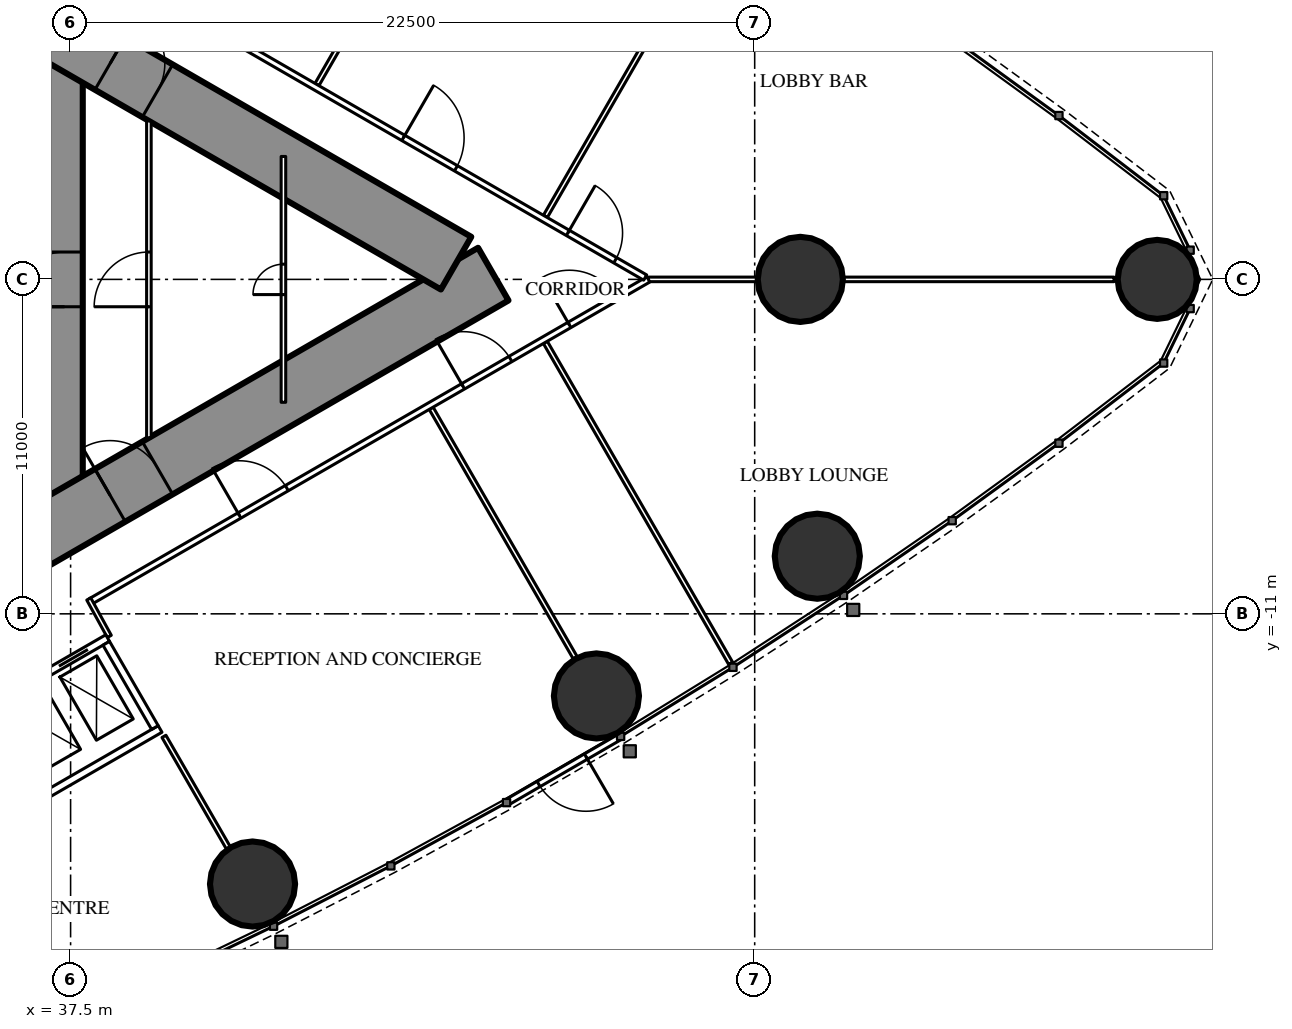
"""IFC4 building model, lengths in metres.
Left out: names, types, materials, properties, quantities, classifications, styles, units other than length and angle.
Written with IfcOpenShell. Run it as: python <this file> out.ifc"""

import sys

from ifc_helpers import new_model, si_unit, direction, frame, frame_2d, origin, origin_2d, place, context, subcontext, project, spatial, rectangle, hollow_circle, extrude, element, fill, save


model = new_model("IFC4")
c1 = context("Model", 3, precision=1e-05, world=origin(), true_north=direction((0.0, 1.0)))
c2 = subcontext(c1, "Body", "Model", "MODEL_VIEW")
j1 = project(units=[si_unit("LENGTHUNIT", "METRE"), si_unit("PLANEANGLEUNIT", "RADIAN")], contexts=[c1])
p1 = place(None, origin())
s1 = spatial("IfcSite", under=j1, at=p1, CompositionType="ELEMENT")
p2 = place(p1, origin())
s2 = spatial("IfcBuilding", under=s1, at=p2, CompositionType="ELEMENT")
p3 = place(p2, origin())
s3 = spatial("IfcBuildingStorey", under=s2, at=p3, CompositionType="ELEMENT", Elevation=0.0)
p4 = place(p3, frame((73.239, 0.0, 0.0), z_axis=(0.0, 0.0, 1.0), x_axis=(1.0, 0.0, 0.0)))
e1 = element("IfcColumn", 1, at=p4, inside=s3, PredefinedType="COLUMN", context=c2, shape_type="SweptSolid", body=[
    extrude(hollow_circle(Radius=1.3, WallThickness=0.1, at=origin_2d()), origin(), (0.0, 0.0, 1.0), 7.2),
])
for number, where, z_axis, x_axis in (
    (2, (43.484, -19.886, 0.0), (0.0, 0.0, 1.0), (1.0, 0.0, 0.0)),
    (3, (54.795, -13.701, 0.0), (0.0, 0.0, 1.0), (1.0, 0.0, 0.0)),
    (4, (62.059, -9.105, 0.0), (0.0, 0.0, 1.0), (1.0, 0.0, 0.0)),
):
    element("IfcColumn", number, at=place(p3, frame(where, z_axis=z_axis, x_axis=x_axis)), inside=s3, PredefinedType="COLUMN", context=c2, shape_type="SweptSolid", body=[
        extrude(hollow_circle(Radius=1.4, WallThickness=0.12, at=origin_2d()), origin(), (0.0, 0.0, 1.0), 7.2),
    ])
p5 = place(p3, frame((61.5, 0.0, 0.0), z_axis=(0.0, 0.0, 1.0), x_axis=(1.0, 0.0, 0.0)))
e5 = element("IfcColumn", 5, at=p5, inside=s3, PredefinedType="COLUMN", context=c2, shape_type="SweptSolid", body=[
    extrude(hollow_circle(Radius=1.4, WallThickness=0.1, at=origin_2d()), origin(), (0.0, 0.0, 1.0), 7.2),
])
p6 = place(p3, frame((37.3, -8.6, 0.0), z_axis=(0.0, 0.0, 1.0), x_axis=(0.0, 1.0, 0.0)))
e6 = element("IfcWall", 6, at=p6, inside=s3, PredefinedType="SHEAR", context=c2, shape_type="SweptSolid", body=[
    extrude(rectangle(XDim=17.2, YDim=1.2, at=frame_2d((8.6, 0.0))), origin(), (0.0, 0.0, 1.0), 7.2),
])
p7 = place(p6, frame((7.7, 0.0, 0.0)))
e7 = element("IfcOpeningElement", 7, at=p7, cuts=e6, PredefinedType="OPENING", context=c2, shape_type="SweptSolid", body=[
    extrude(rectangle(XDim=1.8, YDim=2.2, at=frame_2d((0.9, 1.1))), frame((0.0, 0.61, 0.0), z_axis=(0.0, -1.0, 0.0), x_axis=(1.0, 0.0, 0.0)), (0.0, 0.0, 1.0), 1.22),
])
p8 = place(p3, frame((27.2, -13.8, 0.0), z_axis=(0.0, 0.0, 1.0), x_axis=(0.866027159892, 0.499996958321, 0.0)))
e8 = element("IfcWall", 8, at=p8, inside=s3, PredefinedType="SHEAR", context=c2, shape_type="SweptSolid", body=[
    extrude(rectangle(XDim=27.947, YDim=2.0, at=frame_2d((13.973, 0.0))), origin(), (0.0, 0.0, 1.0), 7.2),
])
p9 = place(p8, frame((4.6, 0.0, 0.0)))
e9 = element("IfcOpeningElement", 9, at=p9, cuts=e8, PredefinedType="OPENING", context=c2, shape_type="SweptSolid", body=[
    extrude(rectangle(XDim=1.0, YDim=2.2, at=frame_2d((0.5, 1.1))), frame((0.0, 1.01, 0.0), z_axis=(0.0, -1.0, 0.0), x_axis=(1.0, 0.0, 0.0)), (0.0, 0.0, 1.0), 2.02),
])
p10 = place(p8, frame((13.395, 0.0, 0.0)))
e10 = element("IfcOpeningElement", 10, at=p10, cuts=e8, PredefinedType="OPENING", context=c2, shape_type="SweptSolid", body=[
    extrude(rectangle(XDim=1.8, YDim=2.2, at=frame_2d((0.9, 1.1))), frame((0.0, 1.01, 0.0), z_axis=(0.0, -1.0, 0.0), x_axis=(1.0, 0.0, 0.0)), (0.0, 0.0, 1.0), 2.02),
])
p11 = place(p3, frame((27.2, 13.8, 0.0), z_axis=(0.0, 0.0, 1.0), x_axis=(0.866024545924, -0.500001485854, 0.0)))
e11 = element("IfcWall", 11, at=p11, inside=s3, PredefinedType="SHEAR", context=c2, shape_type="SweptSolid", body=[
    extrude(rectangle(XDim=26.534, YDim=2.0, at=frame_2d((13.267, 0.0))), origin(), (0.0, 0.0, 1.0), 7.2),
])
p12 = place(p11, frame((4.6, 0.0, 0.0)))
e12 = element("IfcOpeningElement", 12, at=p12, cuts=e11, PredefinedType="OPENING", context=c2, shape_type="SweptSolid", body=[
    extrude(rectangle(XDim=1.0, YDim=2.2, at=frame_2d((0.5, 1.1))), frame((0.0, 1.01, 0.0), z_axis=(0.0, -1.0, 0.0), x_axis=(1.0, 0.0, 0.0)), (0.0, 0.0, 1.0), 2.02),
])
p13 = place(p11, frame((13.395, 0.0, 0.0)))
e13 = element("IfcOpeningElement", 13, at=p13, cuts=e11, PredefinedType="OPENING", context=c2, shape_type="SweptSolid", body=[
    extrude(rectangle(XDim=1.8, YDim=2.2, at=frame_2d((0.9, 1.1))), frame((0.0, 1.01, 0.0), z_axis=(0.0, -1.0, 0.0), x_axis=(1.0, 0.0, 0.0)), (0.0, 0.0, 1.0), 2.02),
])
p14 = place(p3, frame((55.59, -15.031, 0.0), z_axis=(0.0, 0.0, 1.0), x_axis=(-0.864866989785, -0.502001085637, 0.0)))
e14 = element("IfcWall", 14, at=p14, inside=s3, PredefinedType="STANDARD", context=c2, shape_type="SweptSolid", body=[
    extrude(rectangle(XDim=4.338, YDim=0.2, at=frame_2d((2.169, 0.0))), origin(), (0.0, 0.0, 1.0), 6.85),
])
p15 = place(p14, frame((1.319, 0.0, 0.0)))
e15 = element("IfcOpeningElement", 15, at=p15, cuts=e14, PredefinedType="OPENING", context=c2, shape_type="SweptSolid", body=[
    extrude(rectangle(XDim=1.8, YDim=2.4, at=frame_2d((0.9, 1.2))), frame((0.0, 0.11, 0.0), z_axis=(0.0, -1.0, 0.0), x_axis=(1.0, 0.0, 0.0)), (0.0, 0.0, 1.0), 0.22),
])
p16 = place(p3, frame((49.36, -4.239, 0.0), z_axis=(0.0, 0.0, 1.0), x_axis=(0.499984446848, -0.866034383215, 0.0)))
e16 = element("IfcWall", 16, at=p16, inside=s3, PredefinedType="PARTITIONING", context=c2, shape_type="SweptSolid", body=[
    extrude(rectangle(XDim=9.491, YDim=0.15, at=frame_2d((4.746, 0.0))), origin(), (0.0, 0.0, 1.0), 5.85),
])
p17 = place(p3, frame((53.115, -2.071, 0.0), z_axis=(0.0, 0.0, 1.0), x_axis=(0.500000975677, -0.866024840476, 0.0)))
e17 = element("IfcWall", 17, at=p17, inside=s3, PredefinedType="PARTITIONING", context=c2, shape_type="SweptSolid", body=[
    extrude(rectangle(XDim=12.191, YDim=0.15, at=frame_2d((6.095, 0.0))), origin(), (0.0, 0.0, 1.0), 6.85),
])
p18 = place(p3, frame((45.603, 6.408, 0.0), z_axis=(0.0, 0.0, 1.0), x_axis=(0.499999740363, 0.866025553686, 0.0)))
e18 = element("IfcWall", 18, at=p18, inside=s3, PredefinedType="PARTITIONING", context=c2, shape_type="SweptSolid", body=[
    extrude(rectangle(XDim=9.501, YDim=0.15, at=frame_2d((4.751, 0.0))), origin(), (0.0, 0.0, 1.0), 5.85),
])
p19 = place(p3, frame((53.115, 2.071, 0.0), z_axis=(0.0, 0.0, 1.0), x_axis=(0.500000975677, 0.866024840476, 0.0)))
e19 = element("IfcWall", 19, at=p19, inside=s3, PredefinedType="PARTITIONING", context=c2, shape_type="SweptSolid", body=[
    extrude(rectangle(XDim=12.191, YDim=0.15, at=frame_2d((6.095, 0.0))), origin(), (0.0, 0.0, 1.0), 6.85),
])
p20 = place(p3, frame((56.502, 0.0, 0.0), z_axis=(0.0, 0.0, 1.0), x_axis=(1.0, 0.0, 0.0)))
e20 = element("IfcWall", 20, at=p20, inside=s3, PredefinedType="PARTITIONING", context=c2, shape_type="SweptSolid", body=[
    extrude(rectangle(XDim=15.317, YDim=0.15, at=frame_2d((7.658, 0.0))), origin(), (0.0, 0.0, 1.0), 5.85),
])
p21 = place(p3, frame((40.57, -15.03, 0.0), z_axis=(0.0, 0.0, 1.0), x_axis=(0.500012993597, -0.866017901798, 0.0)))
e21 = element("IfcWall", 21, at=p21, inside=s3, PredefinedType="PARTITIONING", context=c2, shape_type="SweptSolid", body=[
    extrude(rectangle(XDim=4.243, YDim=0.15, at=frame_2d((2.122, 0.0))), origin(), (0.0, 0.0, 1.0), 6.85),
])
p22 = place(p3, frame((38.16, -10.59, 0.0), z_axis=(0.0, 0.0, 1.0), x_axis=(0.866027029586, 0.499997184019, 0.0)))
e22 = element("IfcWall", 22, at=p22, inside=s3, PredefinedType="PARTITIONING", context=c2, shape_type="SweptSolid", body=[
    extrude(rectangle(XDim=21.18, YDim=0.2, at=frame_2d((10.59, 0.0))), origin(), (0.0, 0.0, 1.0), 6.85),
])
p23 = place(p22, frame((14.142, 0.0, 0.0)))
e23 = element("IfcOpeningElement", 23, at=p23, cuts=e22, PredefinedType="OPENING", context=c2, shape_type="SweptSolid", body=[
    extrude(rectangle(XDim=1.8, YDim=2.2, at=frame_2d((0.9, 1.1))), frame((0.0, 0.11, 0.0), z_axis=(0.0, -1.0, 0.0), x_axis=(1.0, 0.0, 0.0)), (0.0, 0.0, 1.0), 0.22),
])
p24 = place(p22, frame((18.183, 0.0, 0.0)))
e24 = element("IfcOpeningElement", 24, at=p24, cuts=e22, PredefinedType="OPENING", context=c2, shape_type="SweptSolid", body=[
    extrude(rectangle(XDim=1.8, YDim=2.2, at=frame_2d((0.9, 1.1))), frame((0.0, 0.11, 0.0), z_axis=(0.0, -1.0, 0.0), x_axis=(1.0, 0.0, 0.0)), (0.0, 0.0, 1.0), 0.22),
])
p25 = place(p22, frame((5.65, 0.0, 0.0)))
e25 = element("IfcOpeningElement", 25, at=p25, cuts=e22, PredefinedType="OPENING", context=c2, shape_type="SweptSolid", body=[
    extrude(rectangle(XDim=1.8, YDim=2.2, at=frame_2d((0.9, 1.1))), frame((0.0, 0.11, 0.0), z_axis=(0.0, -1.0, 0.0), x_axis=(1.0, 0.0, 0.0)), (0.0, 0.0, 1.0), 0.22),
])
p26 = place(p3, frame((37.034, 11.24, 0.0), z_axis=(0.0, 0.0, 1.0), x_axis=(0.866025942536, -0.499999066854, 0.0)))
e26 = element("IfcWall", 26, at=p26, inside=s3, PredefinedType="PARTITIONING", context=c2, shape_type="SweptSolid", body=[
    extrude(rectangle(XDim=22.36, YDim=0.2, at=frame_2d((11.18, 0.0))), origin(), (0.0, 0.0, 1.0), 6.85),
])
p27 = place(p26, frame((19.423, 0.0, 0.0)))
e27 = element("IfcOpeningElement", 27, at=p27, cuts=e26, PredefinedType="OPENING", context=c2, shape_type="SweptSolid", body=[
    extrude(rectangle(XDim=1.8, YDim=2.2, at=frame_2d((0.9, 1.1))), frame((0.0, 0.11, 0.0), z_axis=(0.0, -1.0, 0.0), x_axis=(1.0, 0.0, 0.0)), (0.0, 0.0, 1.0), 0.22),
])
p28 = place(p26, frame((13.174, 0.0, 0.0)))
e28 = element("IfcOpeningElement", 28, at=p28, cuts=e26, PredefinedType="OPENING", context=c2, shape_type="SweptSolid", body=[
    extrude(rectangle(XDim=2.0, YDim=2.4, at=frame_2d((1.0, 1.2))), frame((0.0, 0.11, 0.0), z_axis=(0.0, -1.0, 0.0), x_axis=(1.0, 0.0, 0.0)), (0.0, 0.0, 1.0), 0.22),
])
p29 = place(p26, frame((4.602, 0.0, 0.0)))
e29 = element("IfcOpeningElement", 29, at=p29, cuts=e26, PredefinedType="OPENING", context=c2, shape_type="SweptSolid", body=[
    extrude(rectangle(XDim=1.8, YDim=2.2, at=frame_2d((0.9, 1.1))), frame((0.0, 0.11, 0.0), z_axis=(0.0, -1.0, 0.0), x_axis=(1.0, 0.0, 0.0)), (0.0, 0.0, 1.0), 0.22),
])
p30 = place(p3, frame((38.773, -11.742, 0.0), z_axis=(0.0, 0.0, 1.0), x_axis=(-0.481418475768, 0.876490873421, 0.0)))
e30 = element("IfcWall", 30, at=p30, inside=s3, PredefinedType="PARTITIONING", context=c2, shape_type="SweptSolid", body=[
    extrude(rectangle(XDim=1.405, YDim=0.15, at=frame_2d((0.703, 0.0))), origin(), (0.0, 0.0, 1.0), 6.85),
])
p31 = place(p3, frame((40.075, -5.212, 0.0), z_axis=(0.0, 0.0, 1.0), x_axis=(0.0, 1.0, 0.0)))
e31 = element("IfcWall", 31, at=p31, inside=s3, PredefinedType="PARTITIONING", context=c2, shape_type="SweptSolid", body=[
    extrude(rectangle(XDim=10.424, YDim=0.15, at=frame_2d((5.212, 0.0))), origin(), (0.0, 0.0, 1.0), 6.85),
])
p32 = place(p31, frame((4.312, 0.0, 0.0)))
e32 = element("IfcOpeningElement", 32, at=p32, cuts=e31, PredefinedType="OPENING", context=c2, shape_type="SweptSolid", body=[
    extrude(rectangle(XDim=1.8, YDim=2.2, at=frame_2d((0.9, 1.1))), frame((0.0, 0.085, 0.0), z_axis=(0.0, -1.0, 0.0), x_axis=(1.0, 0.0, 0.0)), (0.0, 0.0, 1.0), 0.17),
])
p33 = place(p3, frame((44.5, -4.043, 0.0), z_axis=(0.0, 0.0, 1.0), x_axis=(0.0, 1.0, 0.0)))
e33 = element("IfcWall", 33, at=p33, inside=s3, PredefinedType="PARTITIONING", context=c2, shape_type="SweptSolid", body=[
    extrude(rectangle(XDim=8.085, YDim=0.15, at=frame_2d((4.043, 0.0))), origin(), (0.0, 0.0, 1.0), 5.45),
])
p34 = place(p33, frame((3.543, 0.0, 0.0)))
e34 = element("IfcOpeningElement", 34, at=p34, cuts=e33, PredefinedType="OPENING", context=c2, shape_type="SweptSolid", body=[
    extrude(rectangle(XDim=1.0, YDim=2.2, at=frame_2d((0.5, 1.1))), frame((0.0, 0.085, 0.0), z_axis=(0.0, -1.0, 0.0), x_axis=(1.0, 0.0, 0.0)), (0.0, 0.0, 1.0), 0.17),
])
p35 = place(p3, frame((31.271, -16.097, 0.0), z_axis=(0.0, 0.0, 1.0), x_axis=(0.86604045752, 0.499973925258, 0.0)))
e35 = element("IfcWall", 35, at=p35, inside=s3, PredefinedType="PARTITIONING", context=c2, shape_type="SweptSolid", body=[
    extrude(rectangle(XDim=8.6, YDim=0.25, at=frame_2d((4.3, 0.0))), origin(), (0.0, 0.0, 1.0), 6.85),
])
p36 = place(p35, frame((0.75, 0.0, 0.0)))
e36 = element("IfcOpeningElement", 36, at=p36, cuts=e35, PredefinedType="OPENING", context=c2, shape_type="SweptSolid", body=[
    extrude(rectangle(XDim=1.1, YDim=2.2, at=frame_2d((0.55, 1.1))), frame((0.0, 0.135, 0.0), z_axis=(0.0, -1.0, 0.0), x_axis=(1.0, 0.0, 0.0)), (0.0, 0.0, 1.0), 0.27),
])
p37 = place(p35, frame((2.75, 0.0, 0.0)))
e37 = element("IfcOpeningElement", 37, at=p37, cuts=e35, PredefinedType="OPENING", context=c2, shape_type="SweptSolid", body=[
    extrude(rectangle(XDim=1.1, YDim=2.2, at=frame_2d((0.55, 1.1))), frame((0.0, 0.135, 0.0), z_axis=(0.0, -1.0, 0.0), x_axis=(1.0, 0.0, 0.0)), (0.0, 0.0, 1.0), 0.27),
])
p38 = place(p35, frame((4.75, 0.0, 0.0)))
e38 = element("IfcOpeningElement", 38, at=p38, cuts=e35, PredefinedType="OPENING", context=c2, shape_type="SweptSolid", body=[
    extrude(rectangle(XDim=1.1, YDim=2.2, at=frame_2d((0.55, 1.1))), frame((0.0, 0.135, 0.0), z_axis=(0.0, -1.0, 0.0), x_axis=(1.0, 0.0, 0.0)), (0.0, 0.0, 1.0), 0.27),
])
p39 = place(p35, frame((6.75, 0.0, 0.0)))
e39 = element("IfcOpeningElement", 39, at=p39, cuts=e35, PredefinedType="OPENING", context=c2, shape_type="SweptSolid", body=[
    extrude(rectangle(XDim=1.1, YDim=2.2, at=frame_2d((0.55, 1.1))), frame((0.0, 0.135, 0.0), z_axis=(0.0, -1.0, 0.0), x_axis=(1.0, 0.0, 0.0)), (0.0, 0.0, 1.0), 0.27),
])
p40 = place(p3, frame((32.996, -19.086, 0.0), z_axis=(0.0, 0.0, 1.0), x_axis=(0.866028165386, 0.499995216735, 0.0)))
e40 = element("IfcWall", 40, at=p40, inside=s3, PredefinedType="PARTITIONING", context=c2, shape_type="SweptSolid", body=[
    extrude(rectangle(XDim=8.6, YDim=0.25, at=frame_2d((4.3, 0.0))), origin(), (0.0, 0.0, 1.0), 6.85),
])
p41 = place(p3, frame((38.673, -11.968, 0.0), z_axis=(0.0, 0.0, 1.0), x_axis=(0.499929347863, -0.866066190972, 0.0)))
e41 = element("IfcWall", 41, at=p41, inside=s3, PredefinedType="PARTITIONING", context=c2, shape_type="SweptSolid", body=[
    extrude(rectangle(XDim=3.201, YDim=0.25, at=frame_2d((1.6, 0.0))), origin(), (0.0, 0.0, 1.0), 6.85),
])
p42 = place(p15, origin())
e42 = element("IfcDoor", 42, at=p42, inside=s3, OperationType="SINGLE_SWING_LEFT", PredefinedType="DOOR", context=c2, shape_type="SweptSolid", body=[
    extrude(rectangle(XDim=1.8, YDim=2.4, at=frame_2d((0.9, 1.2))), frame((0.0, 0.025, 0.0), z_axis=(0.0, -1.0, 0.0), x_axis=(1.0, 0.0, 0.0)), (0.0, 0.0, 1.0), 0.05),
])
fill(e15, e42)
p43 = place(p23, origin())
e43 = element("IfcDoor", 43, at=p43, inside=s3, OperationType="DOUBLE_DOOR_SINGLE_SWING", PredefinedType="DOOR", context=c2, shape_type="SweptSolid", body=[
    extrude(rectangle(XDim=1.8, YDim=2.2, at=frame_2d((0.9, 1.1))), frame((0.0, 0.025, 0.0), z_axis=(0.0, -1.0, 0.0), x_axis=(1.0, 0.0, 0.0)), (0.0, 0.0, 1.0), 0.05),
])
fill(e23, e43)
p44 = place(p24, origin())
e44 = element("IfcDoor", 44, at=p44, inside=s3, OperationType="DOUBLE_DOOR_SINGLE_SWING", PredefinedType="DOOR", context=c2, shape_type="SweptSolid", body=[
    extrude(rectangle(XDim=1.8, YDim=2.2, at=frame_2d((0.9, 1.1))), frame((0.0, 0.025, 0.0), z_axis=(0.0, -1.0, 0.0), x_axis=(1.0, 0.0, 0.0)), (0.0, 0.0, 1.0), 0.05),
])
fill(e24, e44)
p45 = place(p27, origin())
e45 = element("IfcDoor", 45, at=p45, inside=s3, OperationType="DOUBLE_DOOR_SINGLE_SWING", PredefinedType="DOOR", context=c2, shape_type="SweptSolid", body=[
    extrude(rectangle(XDim=1.8, YDim=2.2, at=frame_2d((0.9, 1.1))), frame((0.0, 0.025, 0.0), z_axis=(0.0, -1.0, 0.0), x_axis=(1.0, 0.0, 0.0)), (0.0, 0.0, 1.0), 0.05),
])
fill(e27, e45)
p46 = place(p28, origin())
e46 = element("IfcDoor", 46, at=p46, inside=s3, OperationType="DOUBLE_DOOR_SINGLE_SWING", PredefinedType="DOOR", context=c2, shape_type="SweptSolid", body=[
    extrude(rectangle(XDim=2.0, YDim=2.4, at=frame_2d((1.0, 1.2))), frame((0.0, 0.025, 0.0), z_axis=(0.0, -1.0, 0.0), x_axis=(1.0, 0.0, 0.0)), (0.0, 0.0, 1.0), 0.05),
])
fill(e28, e46)
p47 = place(p25, origin())
e47 = element("IfcDoor", 47, at=p47, inside=s3, OperationType="DOUBLE_DOOR_SINGLE_SWING", PredefinedType="DOOR", context=c2, shape_type="SweptSolid", body=[
    extrude(rectangle(XDim=1.8, YDim=2.2, at=frame_2d((0.9, 1.1))), frame((0.0, 0.025, 0.0), z_axis=(0.0, -1.0, 0.0), x_axis=(1.0, 0.0, 0.0)), (0.0, 0.0, 1.0), 0.05),
])
fill(e25, e47)
p48 = place(p32, origin())
e48 = element("IfcDoor", 48, at=p48, inside=s3, OperationType="DOUBLE_DOOR_SINGLE_SWING", PredefinedType="DOOR", context=c2, shape_type="SweptSolid", body=[
    extrude(rectangle(XDim=1.8, YDim=2.2, at=frame_2d((0.9, 1.1))), frame((0.0, 0.025, 0.0), z_axis=(0.0, -1.0, 0.0), x_axis=(1.0, 0.0, 0.0)), (0.0, 0.0, 1.0), 0.05),
])
fill(e32, e48)
p49 = place(p34, origin())
e49 = element("IfcDoor", 49, at=p49, inside=s3, OperationType="SINGLE_SWING_LEFT", PredefinedType="DOOR", context=c2, shape_type="SweptSolid", body=[
    extrude(rectangle(XDim=1.0, YDim=2.2, at=frame_2d((0.5, 1.1))), frame((0.0, 0.025, 0.0), z_axis=(0.0, -1.0, 0.0), x_axis=(1.0, 0.0, 0.0)), (0.0, 0.0, 1.0), 0.05),
])
fill(e34, e49)
p50 = place(p10, origin())
e50 = element("IfcDoor", 50, at=p50, inside=s3, OperationType="DOUBLE_DOOR_SINGLE_SWING", PredefinedType="DOOR", context=c2, shape_type="SweptSolid", body=[
    extrude(rectangle(XDim=1.8, YDim=2.2, at=frame_2d((0.9, 1.1))), frame((0.0, 0.025, 0.0), z_axis=(0.0, -1.0, 0.0), x_axis=(1.0, 0.0, 0.0)), (0.0, 0.0, 1.0), 0.05),
])
fill(e10, e50)
p51 = place(p13, origin())
e51 = element("IfcDoor", 51, at=p51, inside=s3, OperationType="DOUBLE_DOOR_SINGLE_SWING", PredefinedType="DOOR", context=c2, shape_type="SweptSolid", body=[
    extrude(rectangle(XDim=1.8, YDim=2.2, at=frame_2d((0.9, 1.1))), frame((0.0, 0.025, 0.0), z_axis=(0.0, -1.0, 0.0), x_axis=(1.0, 0.0, 0.0)), (0.0, 0.0, 1.0), 0.05),
])
fill(e13, e51)
p52 = place(p7, origin())
e52 = element("IfcDoor", 52, at=p52, inside=s3, OperationType="DOUBLE_DOOR_SINGLE_SWING", PredefinedType="DOOR", context=c2, shape_type="SweptSolid", body=[
    extrude(rectangle(XDim=1.8, YDim=2.2, at=frame_2d((0.9, 1.1))), frame((0.0, 0.025, 0.0), z_axis=(0.0, -1.0, 0.0), x_axis=(1.0, 0.0, 0.0)), (0.0, 0.0, 1.0), 0.05),
])
fill(e7, e52)
p53 = place(p39, origin())
e53 = element("IfcDoor", 53, at=p53, inside=s3, OperationType="DOUBLE_DOOR_SLIDING", PredefinedType="USERDEFINED", context=c2, shape_type="SweptSolid", body=[
    extrude(rectangle(XDim=1.1, YDim=2.2, at=frame_2d((0.55, 1.1))), frame((0.0, 0.025, 0.0), z_axis=(0.0, -1.0, 0.0), x_axis=(1.0, 0.0, 0.0)), (0.0, 0.0, 1.0), 0.05),
])
fill(e39, e53)
save(model, sys.argv[1])
